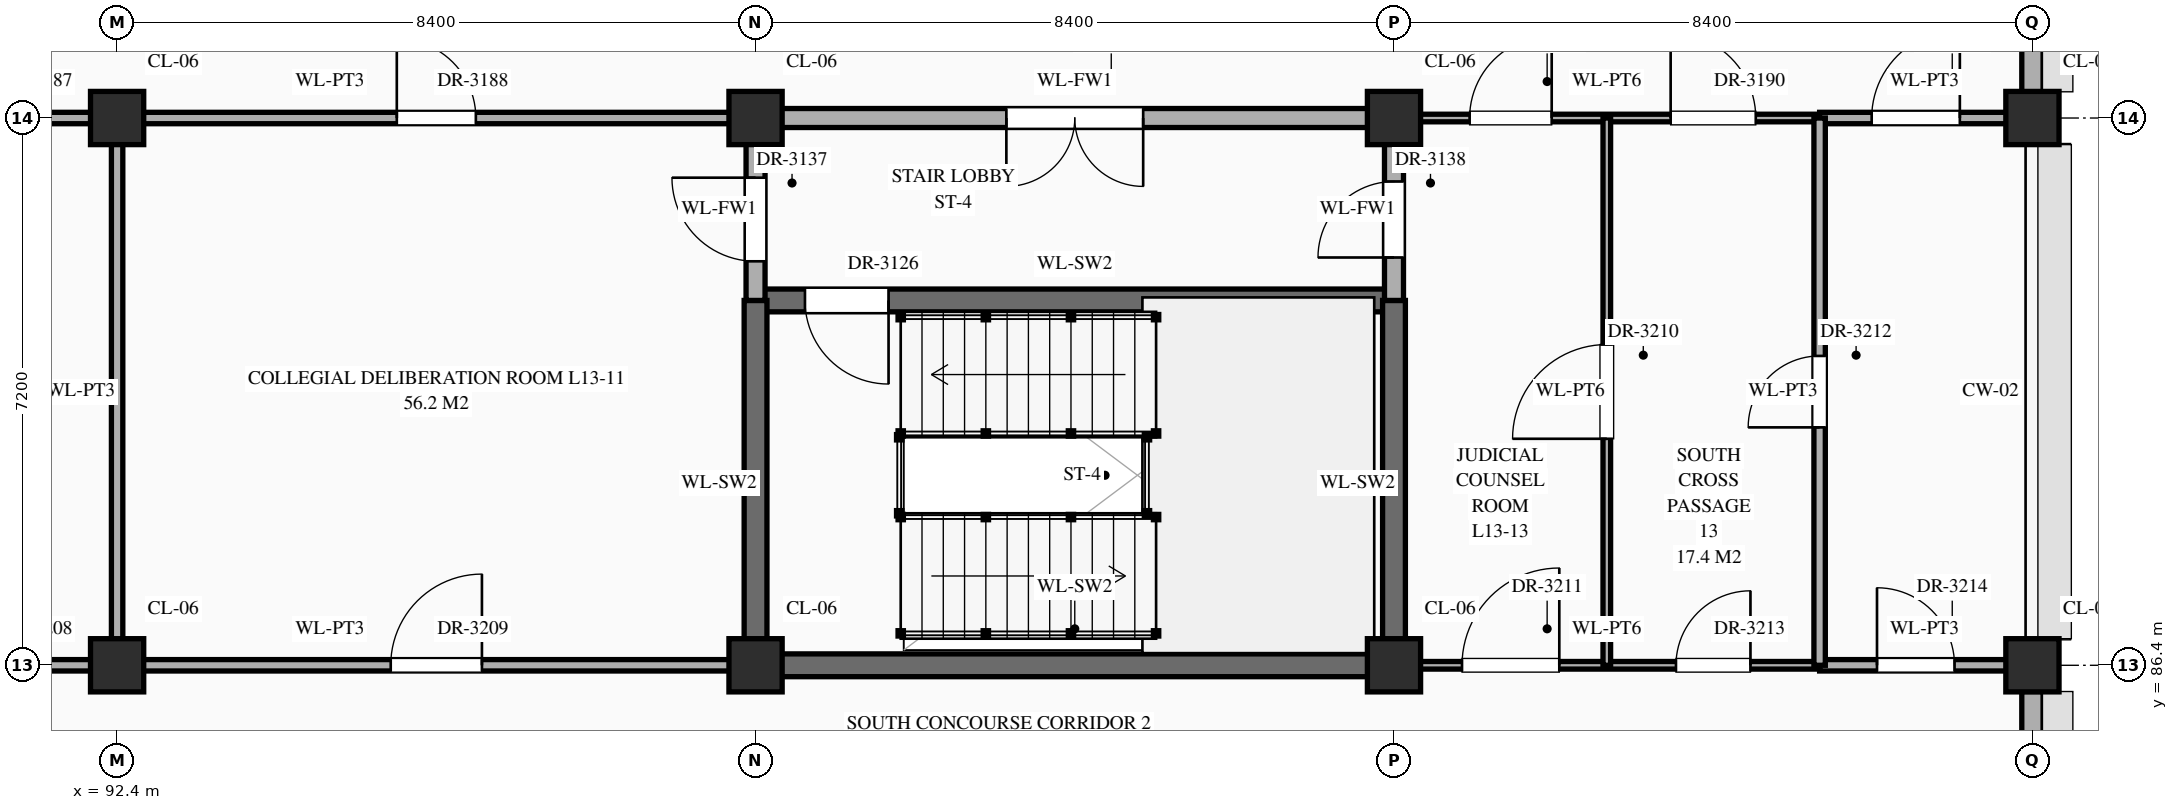
"""IFC4 building model, lengths in metres.
Left out: names, types, materials, properties, quantities, classifications, styles, units other than length and angle.
Written with IfcOpenShell. Run it as: python <this file> out.ifc"""

import sys

from ifc_helpers import new_model, si_unit, direction, frame, frame_2d, origin, origin_2d, place, context, subcontext, project, spatial, rectangle, extrude, element, fill, save


model = new_model("IFC4")
c1 = context("Model", 3, precision=1e-05, world=origin(), true_north=direction((0.0, 1.0)))
c2 = subcontext(c1, "Body", "Model", "MODEL_VIEW")
j1 = project(units=[si_unit("LENGTHUNIT", "METRE"), si_unit("PLANEANGLEUNIT", "RADIAN")], contexts=[c1])
p1 = place(None, origin())
s1 = spatial("IfcSite", under=j1, at=p1, CompositionType="ELEMENT")
p2 = place(p1, origin())
s2 = spatial("IfcBuilding", under=s1, at=p2, CompositionType="ELEMENT")
p3 = place(p2, frame((0.0, 0.0, 56.1)))
s3 = spatial("IfcBuildingStorey", under=s2, at=p3, CompositionType="ELEMENT", Elevation=56.1)
for number, where, z_axis, x_axis in (
    (1, (92.4, 86.4, 0.0), (0.0, 0.0, 1.0), (1.0, 0.0, 0.0)),
    (2, (92.4, 93.6, 0.0), (0.0, 0.0, 1.0), (1.0, 0.0, 0.0)),
    (3, (100.8, 86.4, 0.0), (0.0, 0.0, 1.0), (1.0, 0.0, 0.0)),
    (4, (100.8, 93.6, 0.0), (0.0, 0.0, 1.0), (1.0, 0.0, 0.0)),
    (5, (109.2, 86.4, 0.0), (0.0, 0.0, 1.0), (1.0, 0.0, 0.0)),
    (6, (109.2, 93.6, 0.0), (0.0, 0.0, 1.0), (1.0, 0.0, 0.0)),
    (7, (117.6, 86.4, 0.0), (0.0, 0.0, 1.0), (1.0, 0.0, 0.0)),
    (8, (117.6, 93.6, 0.0), (0.0, 0.0, 1.0), (1.0, 0.0, 0.0)),
):
    element("IfcColumn", number, at=place(p3, frame(where, z_axis=z_axis, x_axis=x_axis)), inside=s3, PredefinedType="COLUMN", context=c2, shape_type="SweptSolid", body=[
        extrude(rectangle(XDim=0.7, YDim=0.7, at=origin_2d()), origin(), (0.0, 0.0, 1.0), 4.2),
    ])
p4 = place(p3, frame((117.6, 79.545, 0.0), z_axis=(0.0, 0.0, 1.0), x_axis=(0.0, 1.0, 0.0)))
e9 = element("IfcWall", 9, at=p4, inside=s3, PredefinedType="STANDARD", context=c2, shape_type="SweptSolid", body=[
    extrude(rectangle(XDim=6.51, YDim=0.28, at=frame_2d((3.255, 0.0))), origin(), (0.0, 0.0, 1.0), 3.2),
])
p5 = place(p4, frame((1.38, 0.0, 0.55)))
e10 = element("IfcOpeningElement", 10, at=p5, cuts=e9, PredefinedType="OPENING", context=c2, shape_type="SweptSolid", body=[
    extrude(rectangle(XDim=1.35, YDim=1.2, at=frame_2d((0.675, 0.6))), frame((0.0, 0.152, 0.0), z_axis=(0.0, -1.0, 0.0), x_axis=(1.0, 0.0, 0.0)), (0.0, 0.0, 1.0), 0.304),
])
p6 = place(p3, frame((117.6, 93.945, 0.0), z_axis=(0.0, 0.0, 1.0), x_axis=(0.0, 1.0, 0.0)))
e11 = element("IfcWall", 11, at=p6, inside=s3, PredefinedType="STANDARD", context=c2, shape_type="SweptSolid", body=[
    extrude(rectangle(XDim=6.51, YDim=0.28, at=frame_2d((3.255, 0.0))), origin(), (0.0, 0.0, 1.0), 3.2),
])
p7 = place(p6, frame((4.105, 0.0, 0.55)))
e12 = element("IfcOpeningElement", 12, at=p7, cuts=e11, PredefinedType="OPENING", context=c2, shape_type="SweptSolid", body=[
    extrude(rectangle(XDim=0.9, YDim=1.56, at=frame_2d((0.45, 0.78))), frame((0.0, 0.152, 0.0), z_axis=(0.0, -1.0, 0.0), x_axis=(1.0, 0.0, 0.0)), (0.0, 0.0, 1.0), 0.304),
])
p8 = place(p3, frame((89.6, 86.4, 0.0), z_axis=(0.0, 0.0, 1.0), x_axis=(1.0, 0.0, 0.0)))
e13 = element("IfcWall", 13, at=p8, inside=s3, PredefinedType="STANDARD", context=c2, shape_type="SweptSolid", body=[
    extrude(rectangle(XDim=11.2, YDim=0.15, at=frame_2d((5.6, 0.0))), origin(), (0.0, 0.0, 1.0), 3.11),
])
p9 = place(p8, frame((0.685, 0.0, 0.0)))
e14 = element("IfcOpeningElement", 14, at=p9, cuts=e13, PredefinedType="OPENING", context=c2, shape_type="SweptSolid", body=[
    extrude(rectangle(XDim=1.16, YDim=2.3, at=frame_2d((0.58, 1.15))), frame((0.0, 0.087, 0.0), z_axis=(0.0, -1.0, 0.0), x_axis=(1.0, 0.0, 0.0)), (0.0, 0.0, 1.0), 0.174),
])
p10 = place(p8, frame((6.4, 0.0, 0.0)))
e15 = element("IfcOpeningElement", 15, at=p10, cuts=e13, PredefinedType="OPENING", context=c2, shape_type="SweptSolid", body=[
    extrude(rectangle(XDim=1.2, YDim=2.35, at=frame_2d((0.6, 1.175))), frame((0.0, 0.087, 0.0), z_axis=(0.0, -1.0, 0.0), x_axis=(1.0, 0.0, 0.0)), (0.0, 0.0, 1.0), 0.174),
])
p11 = place(p3, frame((100.8, 86.4, 0.0), z_axis=(0.0, 0.0, 1.0), x_axis=(1.0, 0.0, 0.0)))
e16 = element("IfcWall", 16, at=p11, inside=s3, PredefinedType="SHEAR", context=c2, shape_type="SweptSolid", body=[
    extrude(rectangle(XDim=8.4, YDim=0.3, at=frame_2d((4.2, 0.0))), origin(), (0.0, 0.0, 1.0), 3.96),
])
p12 = place(p3, frame((109.2, 86.4, 0.0), z_axis=(0.0, 0.0, 1.0), x_axis=(1.0, 0.0, 0.0)))
e17 = element("IfcWall", 17, at=p12, inside=s3, PredefinedType="STANDARD", context=c2, shape_type="SweptSolid", body=[
    extrude(rectangle(XDim=5.6, YDim=0.1, at=frame_2d((2.8, 0.0))), origin(), (0.0, 0.0, 1.0), 3.0),
])
p13 = place(p12, frame((0.895, 0.0, 0.0)))
e18 = element("IfcOpeningElement", 18, at=p13, cuts=e17, PredefinedType="OPENING", context=c2, shape_type="SweptSolid", body=[
    extrude(rectangle(XDim=1.28, YDim=2.35, at=frame_2d((0.64, 1.175))), frame((0.0, 0.062, 0.0), z_axis=(0.0, -1.0, 0.0), x_axis=(1.0, 0.0, 0.0)), (0.0, 0.0, 1.0), 0.124),
])
p14 = place(p12, frame((3.71, 0.0, 0.0)))
e19 = element("IfcOpeningElement", 19, at=p14, cuts=e17, PredefinedType="OPENING", context=c2, shape_type="SweptSolid", body=[
    extrude(rectangle(XDim=0.98, YDim=2.35, at=frame_2d((0.49, 1.175))), frame((0.0, 0.062, 0.0), z_axis=(0.0, -1.0, 0.0), x_axis=(1.0, 0.0, 0.0)), (0.0, 0.0, 1.0), 0.124),
])
p15 = place(p3, frame((114.8, 86.4, 0.0), z_axis=(0.0, 0.0, 1.0), x_axis=(1.0, 0.0, 0.0)))
e20 = element("IfcWall", 20, at=p15, inside=s3, PredefinedType="STANDARD", context=c2, shape_type="SweptSolid", body=[
    extrude(rectangle(XDim=2.76, YDim=0.15, at=frame_2d((1.38, 0.0))), origin(), (0.0, 0.0, 1.0), 3.0),
])
p16 = place(p15, frame((0.755, 0.0, 0.0)))
e21 = element("IfcOpeningElement", 21, at=p16, cuts=e20, PredefinedType="OPENING", context=c2, shape_type="SweptSolid", body=[
    extrude(rectangle(XDim=1.02, YDim=2.4, at=frame_2d((0.51, 1.2))), frame((0.0, 0.087, 0.0), z_axis=(0.0, -1.0, 0.0), x_axis=(1.0, 0.0, 0.0)), (0.0, 0.0, 1.0), 0.174),
])
p17 = place(p3, frame((100.8, 91.2, 0.0), z_axis=(0.0, 0.0, 1.0), x_axis=(1.0, 0.0, 0.0)))
e22 = element("IfcWall", 22, at=p17, inside=s3, PredefinedType="SHEAR", context=c2, shape_type="SweptSolid", body=[
    extrude(rectangle(XDim=8.4, YDim=0.3, at=frame_2d((4.2, 0.0))), origin(), (0.0, 0.0, 1.0), 3.96),
])
p18 = place(p17, frame((0.65, 0.0, 0.0)))
e23 = element("IfcOpeningElement", 23, at=p18, cuts=e22, PredefinedType="OPENING", context=c2, shape_type="SweptSolid", body=[
    extrude(rectangle(XDim=1.1, YDim=2.2, at=frame_2d((0.55, 1.1))), frame((0.0, 0.162, 0.0), z_axis=(0.0, -1.0, 0.0), x_axis=(1.0, 0.0, 0.0)), (0.0, 0.0, 1.0), 0.324),
])
p19 = place(p3, frame((89.6, 93.6, 0.0), z_axis=(0.0, 0.0, 1.0), x_axis=(1.0, 0.0, 0.0)))
e24 = element("IfcWall", 24, at=p19, inside=s3, PredefinedType="STANDARD", context=c2, shape_type="SweptSolid", body=[
    extrude(rectangle(XDim=11.2, YDim=0.15, at=frame_2d((5.6, 0.0))), origin(), (0.0, 0.0, 1.0), 3.11),
])
p20 = place(p19, frame((0.765, 0.0, 0.0)))
e25 = element("IfcOpeningElement", 25, at=p20, cuts=e24, PredefinedType="OPENING", context=c2, shape_type="SweptSolid", body=[
    extrude(rectangle(XDim=1.0, YDim=2.25, at=frame_2d((0.5, 1.125))), frame((0.0, 0.087, 0.0), z_axis=(0.0, -1.0, 0.0), x_axis=(1.0, 0.0, 0.0)), (0.0, 0.0, 1.0), 0.174),
])
p21 = place(p19, frame((6.48, 0.0, 0.0)))
e26 = element("IfcOpeningElement", 26, at=p21, cuts=e24, PredefinedType="OPENING", context=c2, shape_type="SweptSolid", body=[
    extrude(rectangle(XDim=1.04, YDim=2.2, at=frame_2d((0.52, 1.1))), frame((0.0, 0.087, 0.0), z_axis=(0.0, -1.0, 0.0), x_axis=(1.0, 0.0, 0.0)), (0.0, 0.0, 1.0), 0.174),
])
p22 = place(p3, frame((100.8, 93.6, 0.0), z_axis=(0.0, 0.0, 1.0), x_axis=(1.0, 0.0, 0.0)))
e27 = element("IfcWall", 27, at=p22, inside=s3, PredefinedType="STANDARD", context=c2, shape_type="SweptSolid", body=[
    extrude(rectangle(XDim=8.4, YDim=0.25, at=frame_2d((4.2, 0.0))), origin(), (0.0, 0.0, 1.0), 3.11),
])
p23 = place(p22, frame((3.3, 0.0, 0.0)))
e28 = element("IfcOpeningElement", 28, at=p23, cuts=e27, PredefinedType="OPENING", context=c2, shape_type="SweptSolid", body=[
    extrude(rectangle(XDim=1.8, YDim=2.35, at=frame_2d((0.9, 1.175))), frame((0.0, 0.137, 0.0), z_axis=(0.0, -1.0, 0.0), x_axis=(1.0, 0.0, 0.0)), (0.0, 0.0, 1.0), 0.274),
])
p24 = place(p3, frame((109.2, 93.6, 0.0), z_axis=(0.0, 0.0, 1.0), x_axis=(1.0, 0.0, 0.0)))
e29 = element("IfcWall", 29, at=p24, inside=s3, PredefinedType="STANDARD", context=c2, shape_type="SweptSolid", body=[
    extrude(rectangle(XDim=5.6, YDim=0.1, at=frame_2d((2.8, 0.0))), origin(), (0.0, 0.0, 1.0), 3.0),
])
p25 = place(p24, frame((0.995, 0.0, 0.0)))
e30 = element("IfcOpeningElement", 30, at=p25, cuts=e29, PredefinedType="OPENING", context=c2, shape_type="SweptSolid", body=[
    extrude(rectangle(XDim=1.08, YDim=2.25, at=frame_2d((0.54, 1.125))), frame((0.0, 0.062, 0.0), z_axis=(0.0, -1.0, 0.0), x_axis=(1.0, 0.0, 0.0)), (0.0, 0.0, 1.0), 0.124),
])
p26 = place(p24, frame((3.64, 0.0, 0.0)))
e31 = element("IfcOpeningElement", 31, at=p26, cuts=e29, PredefinedType="OPENING", context=c2, shape_type="SweptSolid", body=[
    extrude(rectangle(XDim=1.12, YDim=2.25, at=frame_2d((0.56, 1.125))), frame((0.0, 0.062, 0.0), z_axis=(0.0, -1.0, 0.0), x_axis=(1.0, 0.0, 0.0)), (0.0, 0.0, 1.0), 0.124),
])
p27 = place(p3, frame((114.8, 93.6, 0.0), z_axis=(0.0, 0.0, 1.0), x_axis=(1.0, 0.0, 0.0)))
e32 = element("IfcWall", 32, at=p27, inside=s3, PredefinedType="STANDARD", context=c2, shape_type="SweptSolid", body=[
    extrude(rectangle(XDim=2.76, YDim=0.15, at=frame_2d((1.38, 0.0))), origin(), (0.0, 0.0, 1.0), 3.0),
])
p28 = place(p27, frame((0.685, 0.0, 0.0)))
e33 = element("IfcOpeningElement", 33, at=p28, cuts=e32, PredefinedType="OPENING", context=c2, shape_type="SweptSolid", body=[
    extrude(rectangle(XDim=1.16, YDim=2.3, at=frame_2d((0.58, 1.15))), frame((0.0, 0.087, 0.0), z_axis=(0.0, -1.0, 0.0), x_axis=(1.0, 0.0, 0.0)), (0.0, 0.0, 1.0), 0.174),
])
p29 = place(p3, frame((92.4, 86.4, 0.0), z_axis=(0.0, 0.0, 1.0), x_axis=(0.0, 1.0, 0.0)))
e34 = element("IfcWall", 34, at=p29, inside=s3, PredefinedType="STANDARD", context=c2, shape_type="SweptSolid", body=[
    extrude(rectangle(XDim=7.2, YDim=0.15, at=frame_2d((3.6, 0.0))), origin(), (0.0, 0.0, 1.0), 3.21),
])
p30 = place(p3, frame((100.8, 86.4, 0.0), z_axis=(0.0, 0.0, 1.0), x_axis=(0.0, 1.0, 0.0)))
e35 = element("IfcWall", 35, at=p30, inside=s3, PredefinedType="SHEAR", context=c2, shape_type="SweptSolid", body=[
    extrude(rectangle(XDim=4.8, YDim=0.3, at=frame_2d((2.4, 0.0))), origin(), (0.0, 0.0, 1.0), 3.96),
])
p31 = place(p3, frame((100.8, 91.2, 0.0), z_axis=(0.0, 0.0, 1.0), x_axis=(0.0, 1.0, 0.0)))
e36 = element("IfcWall", 36, at=p31, inside=s3, PredefinedType="STANDARD", context=c2, shape_type="SweptSolid", body=[
    extrude(rectangle(XDim=2.4, YDim=0.25, at=frame_2d((1.2, 0.0))), origin(), (0.0, 0.0, 1.0), 3.21),
])
p32 = place(p31, frame((0.515, 0.0, 0.0)))
e37 = element("IfcOpeningElement", 37, at=p32, cuts=e36, PredefinedType="OPENING", context=c2, shape_type="SweptSolid", body=[
    extrude(rectangle(XDim=1.1, YDim=2.2, at=frame_2d((0.55, 1.1))), frame((0.0, 0.137, 0.0), z_axis=(0.0, -1.0, 0.0), x_axis=(1.0, 0.0, 0.0)), (0.0, 0.0, 1.0), 0.274),
])
p33 = place(p3, frame((109.2, 86.4, 0.0), z_axis=(0.0, 0.0, 1.0), x_axis=(0.0, 1.0, 0.0)))
e38 = element("IfcWall", 38, at=p33, inside=s3, PredefinedType="SHEAR", context=c2, shape_type="SweptSolid", body=[
    extrude(rectangle(XDim=4.8, YDim=0.3, at=frame_2d((2.4, 0.0))), origin(), (0.0, 0.0, 1.0), 3.96),
])
p34 = place(p3, frame((109.2, 91.2, 0.0), z_axis=(0.0, 0.0, 1.0), x_axis=(0.0, 1.0, 0.0)))
e39 = element("IfcWall", 39, at=p34, inside=s3, PredefinedType="STANDARD", context=c2, shape_type="SweptSolid", body=[
    extrude(rectangle(XDim=2.4, YDim=0.25, at=frame_2d((1.2, 0.0))), origin(), (0.0, 0.0, 1.0), 3.1),
])
p35 = place(p34, frame((0.565, 0.0, 0.0)))
e40 = element("IfcOpeningElement", 40, at=p35, cuts=e39, PredefinedType="OPENING", context=c2, shape_type="SweptSolid", body=[
    extrude(rectangle(XDim=1.0, YDim=2.2, at=frame_2d((0.5, 1.1))), frame((0.0, 0.137, 0.0), z_axis=(0.0, -1.0, 0.0), x_axis=(1.0, 0.0, 0.0)), (0.0, 0.0, 1.0), 0.274),
])
p36 = place(p3, frame((112.0, 86.4, 0.0), z_axis=(0.0, 0.0, 1.0), x_axis=(0.0, 1.0, 0.0)))
e41 = element("IfcWall", 41, at=p36, inside=s3, PredefinedType="STANDARD", context=c2, shape_type="SweptSolid", body=[
    extrude(rectangle(XDim=7.2, YDim=0.1, at=frame_2d((3.6, 0.0))), origin(), (0.0, 0.0, 1.0), 3.85),
])
p37 = place(p36, frame((2.98, 0.0, 0.0)))
e42 = element("IfcOpeningElement", 42, at=p37, cuts=e41, PredefinedType="OPENING", context=c2, shape_type="SweptSolid", body=[
    extrude(rectangle(XDim=1.24, YDim=2.3, at=frame_2d((0.62, 1.15))), frame((0.0, 0.062, 0.0), z_axis=(0.0, -1.0, 0.0), x_axis=(1.0, 0.0, 0.0)), (0.0, 0.0, 1.0), 0.124),
])
p38 = place(p3, frame((114.8, 86.4, 0.0), z_axis=(0.0, 0.0, 1.0), x_axis=(0.0, 1.0, 0.0)))
e43 = element("IfcWall", 43, at=p38, inside=s3, PredefinedType="STANDARD", context=c2, shape_type="SweptSolid", body=[
    extrude(rectangle(XDim=7.2, YDim=0.15, at=frame_2d((3.6, 0.0))), origin(), (0.0, 0.0, 1.0), 3.85),
])
p39 = place(p38, frame((3.13, 0.0, 0.0)))
e44 = element("IfcOpeningElement", 44, at=p39, cuts=e43, PredefinedType="OPENING", context=c2, shape_type="SweptSolid", body=[
    extrude(rectangle(XDim=0.94, YDim=2.3, at=frame_2d((0.47, 1.15))), frame((0.0, 0.087, 0.0), z_axis=(0.0, -1.0, 0.0), x_axis=(1.0, 0.0, 0.0)), (0.0, 0.0, 1.0), 0.174),
])
p40 = place(p18, frame((1.1, 0.0, 0.0), z_axis=(0.0, 0.0, 1.0), x_axis=(-1.0, 0.0, 0.0)))
e45 = element("IfcDoor", 45, at=p40, inside=s3, OperationType="SINGLE_SWING_LEFT", PredefinedType="DOOR", context=c2, shape_type="SweptSolid", body=[
    extrude(rectangle(XDim=1.1, YDim=2.2, at=frame_2d((0.55, 1.1))), frame((0.0, 0.025, 0.0), z_axis=(0.0, -1.0, 0.0), x_axis=(1.0, 0.0, 0.0)), (0.0, 0.0, 1.0), 0.05),
])
fill(e23, e45)
p41 = place(p23, frame((1.8, 0.0, 0.0), z_axis=(0.0, 0.0, 1.0), x_axis=(-1.0, 0.0, 0.0)))
e46 = element("IfcDoor", 46, at=p41, inside=s3, OperationType="DOUBLE_DOOR_SINGLE_SWING", PredefinedType="DOOR", context=c2, shape_type="SweptSolid", body=[
    extrude(rectangle(XDim=1.8, YDim=2.35, at=frame_2d((0.9, 1.175))), frame((0.0, 0.025, 0.0), z_axis=(0.0, -1.0, 0.0), x_axis=(1.0, 0.0, 0.0)), (0.0, 0.0, 1.0), 0.05),
])
fill(e28, e46)
p42 = place(p32, origin())
e47 = element("IfcDoor", 47, at=p42, inside=s3, OperationType="SINGLE_SWING_RIGHT", PredefinedType="DOOR", context=c2, shape_type="SweptSolid", body=[
    extrude(rectangle(XDim=1.1, YDim=2.2, at=frame_2d((0.55, 1.1))), frame((0.0, 0.025, 0.0), z_axis=(0.0, -1.0, 0.0), x_axis=(1.0, 0.0, 0.0)), (0.0, 0.0, 1.0), 0.05),
])
fill(e37, e47)
p43 = place(p35, origin())
e48 = element("IfcDoor", 48, at=p43, inside=s3, OperationType="SINGLE_SWING_LEFT", PredefinedType="DOOR", context=c2, shape_type="SweptSolid", body=[
    extrude(rectangle(XDim=1.0, YDim=2.2, at=frame_2d((0.5, 1.1))), frame((0.0, 0.025, 0.0), z_axis=(0.0, -1.0, 0.0), x_axis=(1.0, 0.0, 0.0)), (0.0, 0.0, 1.0), 0.05),
])
fill(e40, e48)
p44 = place(p21, origin())
e49 = element("IfcDoor", 49, at=p44, inside=s3, OperationType="SINGLE_SWING_LEFT", PredefinedType="DOOR", context=c2, shape_type="SweptSolid", body=[
    extrude(rectangle(XDim=1.04, YDim=2.2, at=frame_2d((0.52, 1.1))), frame((0.0, 0.025, 0.0), z_axis=(0.0, -1.0, 0.0), x_axis=(1.0, 0.0, 0.0)), (0.0, 0.0, 1.0), 0.05),
])
fill(e26, e49)
p45 = place(p25, origin())
e50 = element("IfcDoor", 50, at=p45, inside=s3, OperationType="SINGLE_SWING_RIGHT", PredefinedType="DOOR", context=c2, shape_type="SweptSolid", body=[
    extrude(rectangle(XDim=1.08, YDim=2.25, at=frame_2d((0.54, 1.125))), frame((0.0, 0.025, 0.0), z_axis=(0.0, -1.0, 0.0), x_axis=(1.0, 0.0, 0.0)), (0.0, 0.0, 1.0), 0.05),
])
fill(e30, e50)
p46 = place(p26, origin())
e51 = element("IfcDoor", 51, at=p46, inside=s3, OperationType="SINGLE_SWING_LEFT", PredefinedType="DOOR", context=c2, shape_type="SweptSolid", body=[
    extrude(rectangle(XDim=1.12, YDim=2.25, at=frame_2d((0.56, 1.125))), frame((0.0, 0.025, 0.0), z_axis=(0.0, -1.0, 0.0), x_axis=(1.0, 0.0, 0.0)), (0.0, 0.0, 1.0), 0.05),
])
fill(e31, e51)
p47 = place(p28, origin())
e52 = element("IfcDoor", 52, at=p47, inside=s3, OperationType="SINGLE_SWING_RIGHT", PredefinedType="DOOR", context=c2, shape_type="SweptSolid", body=[
    extrude(rectangle(XDim=1.16, YDim=2.3, at=frame_2d((0.58, 1.15))), frame((0.0, 0.025, 0.0), z_axis=(0.0, -1.0, 0.0), x_axis=(1.0, 0.0, 0.0)), (0.0, 0.0, 1.0), 0.05),
])
fill(e33, e52)
p48 = place(p10, origin())
e53 = element("IfcDoor", 53, at=p48, inside=s3, OperationType="SINGLE_SWING_RIGHT", PredefinedType="DOOR", context=c2, shape_type="SweptSolid", body=[
    extrude(rectangle(XDim=1.2, YDim=2.35, at=frame_2d((0.6, 1.175))), frame((0.0, 0.025, 0.0), z_axis=(0.0, -1.0, 0.0), x_axis=(1.0, 0.0, 0.0)), (0.0, 0.0, 1.0), 0.05),
])
fill(e15, e53)
p49 = place(p37, origin())
e54 = element("IfcDoor", 54, at=p49, inside=s3, OperationType="SINGLE_SWING_LEFT", PredefinedType="DOOR", context=c2, shape_type="SweptSolid", body=[
    extrude(rectangle(XDim=1.24, YDim=2.3, at=frame_2d((0.62, 1.15))), frame((0.0, 0.025, 0.0), z_axis=(0.0, -1.0, 0.0), x_axis=(1.0, 0.0, 0.0)), (0.0, 0.0, 1.0), 0.05),
])
fill(e42, e54)
p50 = place(p13, origin())
e55 = element("IfcDoor", 55, at=p50, inside=s3, OperationType="SINGLE_SWING_RIGHT", PredefinedType="DOOR", context=c2, shape_type="SweptSolid", body=[
    extrude(rectangle(XDim=1.28, YDim=2.35, at=frame_2d((0.64, 1.175))), frame((0.0, 0.025, 0.0), z_axis=(0.0, -1.0, 0.0), x_axis=(1.0, 0.0, 0.0)), (0.0, 0.0, 1.0), 0.05),
])
fill(e18, e55)
p51 = place(p39, origin())
e56 = element("IfcDoor", 56, at=p51, inside=s3, OperationType="SINGLE_SWING_LEFT", PredefinedType="DOOR", context=c2, shape_type="SweptSolid", body=[
    extrude(rectangle(XDim=0.94, YDim=2.3, at=frame_2d((0.47, 1.15))), frame((0.0, 0.025, 0.0), z_axis=(0.0, -1.0, 0.0), x_axis=(1.0, 0.0, 0.0)), (0.0, 0.0, 1.0), 0.05),
])
fill(e44, e56)
p52 = place(p14, origin())
e57 = element("IfcDoor", 57, at=p52, inside=s3, OperationType="SINGLE_SWING_RIGHT", PredefinedType="DOOR", context=c2, shape_type="SweptSolid", body=[
    extrude(rectangle(XDim=0.98, YDim=2.35, at=frame_2d((0.49, 1.175))), frame((0.0, 0.025, 0.0), z_axis=(0.0, -1.0, 0.0), x_axis=(1.0, 0.0, 0.0)), (0.0, 0.0, 1.0), 0.05),
])
fill(e19, e57)
p53 = place(p16, origin())
e58 = element("IfcDoor", 58, at=p53, inside=s3, OperationType="SINGLE_SWING_LEFT", PredefinedType="DOOR", context=c2, shape_type="SweptSolid", body=[
    extrude(rectangle(XDim=1.02, YDim=2.4, at=frame_2d((0.51, 1.2))), frame((0.0, 0.025, 0.0), z_axis=(0.0, -1.0, 0.0), x_axis=(1.0, 0.0, 0.0)), (0.0, 0.0, 1.0), 0.05),
])
fill(e21, e58)
save(model, sys.argv[1])
